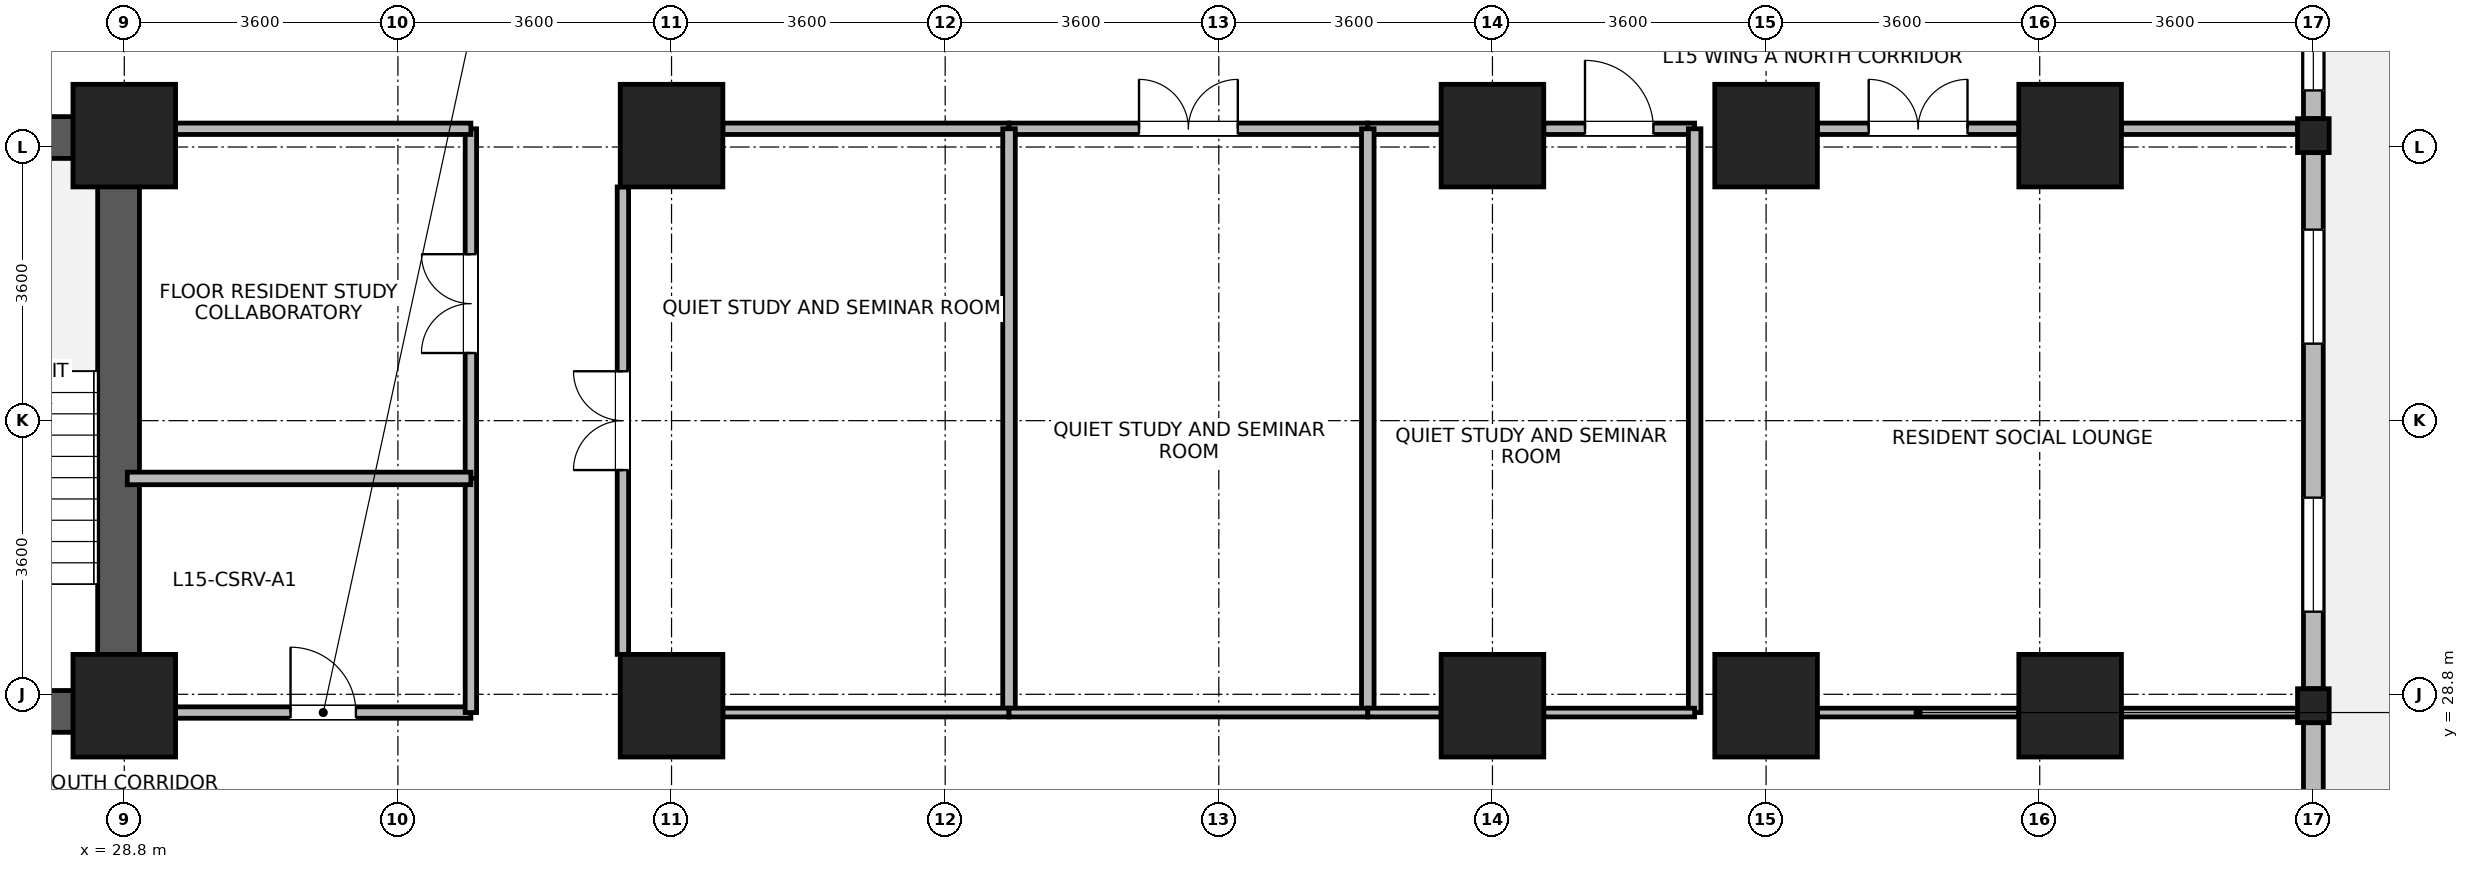
"""IFC4 building model, lengths in metres.
Left out: names, types, materials, properties, quantities, classifications, styles, units other than length and angle.
Written with IfcOpenShell. Run it as: python <this file> out.ifc"""

import sys

from ifc_helpers import new_model, si_unit, direction, frame, frame_2d, origin, origin_2d, place, context, subcontext, project, spatial, rectangle, i_section, extrude, source, transform, mapped, element, fill, save


model = new_model("IFC4")
c1 = context("Model", 3, precision=1e-05, world=origin(), true_north=direction((0.0, 1.0)))
c2 = subcontext(c1, "Body", "Model", "MODEL_VIEW")
j1 = project(units=[si_unit("LENGTHUNIT", "METRE"), si_unit("PLANEANGLEUNIT", "RADIAN")], contexts=[c1])
p1 = place(None, origin())
s1 = spatial("IfcSite", under=j1, at=p1, CompositionType="ELEMENT")
p2 = place(p1, origin())
s2 = spatial("IfcBuilding", under=s1, at=p2, CompositionType="ELEMENT")
p3 = place(p2, frame((0.0, 0.0, 62.3)))
s3 = spatial("IfcBuildingStorey", under=s2, at=p3, CompositionType="ELEMENT", Elevation=62.3)
p4 = place(p3, frame((28.725, 28.3, 0.0), z_axis=(0.0, 0.0, 1.0), x_axis=(0.0, 1.0, 0.0)))
e1 = element("IfcWall", 1, at=p4, inside=s3, PredefinedType="SHEAR", context=c2, shape_type="SweptSolid", body=[
    extrude(rectangle(XDim=8.1, YDim=0.55, at=frame_2d((4.05, 0.0))), origin(), (0.0, 0.0, 1.0), 3.45),
])
for number, where, z_axis, x_axis in (
    (2, (25.25, 28.575, 0.0), (0.0, 0.0, 1.0), (1.0, 0.0, 0.0)),
    (3, (25.25, 36.125, 0.0), (0.0, 0.0, 1.0), (1.0, 0.0, 0.0)),
):
    element("IfcWall", number, at=place(p3, frame(where, z_axis=z_axis, x_axis=x_axis)), inside=s3, PredefinedType="SHEAR", context=c2, shape_type="SweptSolid", body=[
        extrude(rectangle(XDim=3.2, YDim=0.55, at=frame_2d((1.6, 0.0))), origin(), (0.0, 0.0, 1.0), 3.45),
    ])
m1 = source(origin(), c2, "Body", "SweptSolid", [
    extrude(rectangle(XDim=1.35, YDim=1.35, at=origin_2d()), origin(), (0.0, 0.0, 1.0), 3.7),
])
for number, where, z_axis, x_axis in (
    (4, (28.8, 28.65, 0.0), (0.0, 0.0, 1.0), (1.0, 0.0, 0.0)),
    (5, (28.8, 36.15, 0.0), (0.0, 0.0, 1.0), (1.0, 0.0, 0.0)),
    (6, (36.0, 28.65, 0.0), (0.0, 0.0, 1.0), (1.0, 0.0, 0.0)),
    (7, (36.0, 36.15, 0.0), (0.0, 0.0, 1.0), (1.0, 0.0, 0.0)),
    (8, (46.8, 28.65, 0.0), (0.0, 0.0, 1.0), (1.0, 0.0, 0.0)),
    (9, (46.8, 36.15, 0.0), (0.0, 0.0, 1.0), (1.0, 0.0, 0.0)),
    (10, (50.4, 28.65, 0.0), (0.0, 0.0, 1.0), (1.0, 0.0, 0.0)),
    (11, (50.4, 36.15, 0.0), (0.0, 0.0, 1.0), (1.0, 0.0, 0.0)),
    (12, (54.4, 28.65, 0.0), (0.0, 0.0, 1.0), (1.0, 0.0, 0.0)),
    (13, (54.4, 36.15, 0.0), (0.0, 0.0, 1.0), (1.0, 0.0, 0.0)),
):
    element("IfcColumn", number, at=place(p3, frame(where, z_axis=z_axis, x_axis=x_axis)), inside=s3, PredefinedType="COLUMN", context=c2, shape_type="MappedRepresentation", body=[
        mapped(m1, transform((0.0, 0.0, 0.0), x_axis=(1.0, 0.0, 0.0), y_axis=(0.0, 1.0, 0.0), z_axis=(0.0, 0.0, 1.0), scale=1.0)),
    ])
m2 = source(origin(), c2, "Body", "SweptSolid", [
    extrude(i_section(OverallWidth=0.416, OverallDepth=0.446, WebThickness=0.029, FlangeThickness=0.04, FilletRadius=0.015, at=origin_2d()), origin(), (0.0, 0.0, 1.0), 3.7),
])
for number, where, z_axis, x_axis in (
    (14, (57.6, 28.65, 0.0), (0.0, 0.0, 1.0), (1.0, 0.0, 0.0)),
    (15, (57.6, 36.15, 0.0), (0.0, 0.0, 1.0), (1.0, 0.0, 0.0)),
):
    element("IfcColumn", number, at=place(p3, frame(where, z_axis=z_axis, x_axis=x_axis)), inside=s3, PredefinedType="COLUMN", context=c2, shape_type="MappedRepresentation", body=[
        mapped(m2, transform((0.0, 0.0, 0.0), x_axis=(1.0, 0.0, 0.0), y_axis=(0.0, 1.0, 0.0), z_axis=(0.0, 0.0, 1.0), scale=1.0)),
    ])
p5 = place(p3, frame((57.6, 28.426, 0.0), z_axis=(0.0, 0.0, 1.0), x_axis=(0.0, -1.0, 0.0)))
e16 = element("IfcWall", 16, at=p5, inside=s3, PredefinedType="STANDARD", context=c2, shape_type="SweptSolid", body=[
    extrude(rectangle(XDim=6.602, YDim=0.26, at=frame_2d((3.301, 0.0))), origin(), (0.0, 0.0, 1.0), 2.93),
])
p6 = place(p5, frame((4.201, 0.0, 0.85)))
e17 = element("IfcOpeningElement", 17, at=p6, cuts=e16, PredefinedType="OPENING", context=c2, shape_type="SweptSolid", body=[
    extrude(rectangle(XDim=1.5, YDim=1.85, at=frame_2d((0.75, 0.925))), frame((0.0, 0.14, 0.0), z_axis=(0.0, -1.0, 0.0), x_axis=(1.0, 0.0, 0.0)), (0.0, 0.0, 1.0), 0.28),
])
p7 = place(p5, frame((2.826, 0.0, 0.85)))
e18 = element("IfcOpeningElement", 18, at=p7, cuts=e16, PredefinedType="OPENING", context=c2, shape_type="SweptSolid", body=[
    extrude(rectangle(XDim=0.95, YDim=1.75, at=frame_2d((0.475, 0.875))), frame((0.0, 0.14, 0.0), z_axis=(0.0, -1.0, 0.0), x_axis=(1.0, 0.0, 0.0)), (0.0, 0.0, 1.0), 0.28),
])
p8 = place(p3, frame((57.6, 35.926, 0.0), z_axis=(0.0, 0.0, 1.0), x_axis=(0.0, -1.0, 0.0)))
e19 = element("IfcWall", 19, at=p8, inside=s3, PredefinedType="STANDARD", context=c2, shape_type="SweptSolid", body=[
    extrude(rectangle(XDim=7.052, YDim=0.26, at=frame_2d((3.526, 0.0))), origin(), (0.0, 0.0, 1.0), 2.93),
])
p9 = place(p8, frame((1.013, 0.0, 0.85)))
e20 = element("IfcOpeningElement", 20, at=p9, cuts=e19, PredefinedType="OPENING", context=c2, shape_type="SweptSolid", body=[
    extrude(rectangle(XDim=1.5, YDim=1.85, at=frame_2d((0.75, 0.925))), frame((0.0, 0.14, 0.0), z_axis=(0.0, -1.0, 0.0), x_axis=(1.0, 0.0, 0.0)), (0.0, 0.0, 1.0), 0.28),
])
p10 = place(p8, frame((4.539, 0.0, 0.85)))
e21 = element("IfcOpeningElement", 21, at=p10, cuts=e19, PredefinedType="OPENING", context=c2, shape_type="SweptSolid", body=[
    extrude(rectangle(XDim=1.5, YDim=1.85, at=frame_2d((0.75, 0.925))), frame((0.0, 0.14, 0.0), z_axis=(0.0, -1.0, 0.0), x_axis=(1.0, 0.0, 0.0)), (0.0, 0.0, 1.0), 0.28),
])
p11 = place(p3, frame((57.6, 39.73, 0.0), z_axis=(0.0, 0.0, 1.0), x_axis=(0.0, -1.0, 0.0)))
e22 = element("IfcWall", 22, at=p11, inside=s3, PredefinedType="STANDARD", context=c2, shape_type="SweptSolid", body=[
    extrude(rectangle(XDim=3.356, YDim=0.26, at=frame_2d((1.678, 0.0))), origin(), (0.0, 0.0, 1.0), 3.43),
])
p12 = place(p11, frame((2.035, 0.0, 0.85)))
e23 = element("IfcOpeningElement", 23, at=p12, cuts=e22, PredefinedType="OPENING", context=c2, shape_type="SweptSolid", body=[
    extrude(rectangle(XDim=0.95, YDim=1.75, at=frame_2d((0.475, 0.875))), frame((0.0, 0.14, 0.0), z_axis=(0.0, -1.0, 0.0), x_axis=(1.0, 0.0, 0.0)), (0.0, 0.0, 1.0), 0.28),
])
p13 = place(p11, frame((0.263, 0.0, 0.85)))
e24 = element("IfcOpeningElement", 24, at=p13, cuts=e22, PredefinedType="OPENING", context=c2, shape_type="SweptSolid", body=[
    extrude(rectangle(XDim=0.95, YDim=1.75, at=frame_2d((0.475, 0.875))), frame((0.0, 0.14, 0.0), z_axis=(0.0, -1.0, 0.0), x_axis=(1.0, 0.0, 0.0)), (0.0, 0.0, 1.0), 0.28),
])
p14 = place(p3, frame((51.075, 36.24, 0.0), z_axis=(0.0, 0.0, 1.0), x_axis=(1.0, 0.0, 0.0)))
e25 = element("IfcWall", 25, at=p14, inside=s3, PredefinedType="PARTITIONING", context=c2, shape_type="SweptSolid", body=[
    extrude(rectangle(XDim=2.65, YDim=0.15, at=frame_2d((1.325, 0.0))), origin(), (0.0, 0.0, 1.0), 2.78),
])
p15 = place(p14, frame((0.675, 0.0, 0.0)))
e26 = element("IfcOpeningElement", 26, at=p15, cuts=e25, PredefinedType="OPENING", context=c2, shape_type="SweptSolid", body=[
    extrude(rectangle(XDim=1.3, YDim=2.12, at=frame_2d((0.65, 1.06))), frame((0.0, 0.085, 0.0), z_axis=(0.0, -1.0, 0.0), x_axis=(1.0, 0.0, 0.0)), (0.0, 0.0, 1.0), 0.17),
])
p16 = place(p3, frame((55.075, 36.24, 0.0), z_axis=(0.0, 0.0, 1.0), x_axis=(1.0, 0.0, 0.0)))
e27 = element("IfcWall", 27, at=p16, inside=s3, PredefinedType="PARTITIONING", context=c2, shape_type="SweptSolid", body=[
    extrude(rectangle(XDim=2.317, YDim=0.15, at=frame_2d((1.159, 0.0))), origin(), (0.0, 0.0, 1.0), 2.78),
])
p17 = place(p3, frame((35.36, 29.325, 0.0), z_axis=(0.0, 0.0, 1.0), x_axis=(0.0, 1.0, 0.0)))
e28 = element("IfcWall", 28, at=p17, inside=s3, PredefinedType="PARTITIONING", context=c2, shape_type="SweptSolid", body=[
    extrude(rectangle(XDim=6.15, YDim=0.15, at=frame_2d((3.075, 0.0))), origin(), (0.0, 0.0, 1.0), 3.43),
])
p18 = place(p17, frame((2.425, 0.0, 0.0)))
e29 = element("IfcOpeningElement", 29, at=p18, cuts=e28, PredefinedType="OPENING", context=c2, shape_type="SweptSolid", body=[
    extrude(rectangle(XDim=1.3, YDim=2.12, at=frame_2d((0.65, 1.06))), frame((0.0, 0.085, 0.0), z_axis=(0.0, -1.0, 0.0), x_axis=(1.0, 0.0, 0.0)), (0.0, 0.0, 1.0), 0.17),
])
p19 = place(p3, frame((36.675, 36.24, 0.0), z_axis=(0.0, 0.0, 1.0), x_axis=(1.0, 0.0, 0.0)))
e30 = element("IfcWall", 30, at=p19, inside=s3, PredefinedType="PARTITIONING", context=c2, shape_type="SweptSolid", body=[
    extrude(rectangle(XDim=3.765, YDim=0.15, at=frame_2d((1.882, 0.0))), origin(), (0.0, 0.0, 1.0), 2.78),
])
p20 = place(p3, frame((40.44, 36.24, 0.0), z_axis=(0.0, 0.0, 1.0), x_axis=(1.0, 0.0, 0.0)))
e31 = element("IfcWall", 31, at=p20, inside=s3, PredefinedType="PARTITIONING", context=c2, shape_type="SweptSolid", body=[
    extrude(rectangle(XDim=4.72, YDim=0.15, at=frame_2d((2.36, 0.0))), origin(), (0.0, 0.0, 1.0), 2.78),
])
p21 = place(p20, frame((1.71, 0.0, 0.0)))
e32 = element("IfcOpeningElement", 32, at=p21, cuts=e31, PredefinedType="OPENING", context=c2, shape_type="SweptSolid", body=[
    extrude(rectangle(XDim=1.3, YDim=2.12, at=frame_2d((0.65, 1.06))), frame((0.0, 0.085, 0.0), z_axis=(0.0, -1.0, 0.0), x_axis=(1.0, 0.0, 0.0)), (0.0, 0.0, 1.0), 0.17),
])
p22 = place(p3, frame((33.36, 31.64, 0.0), z_axis=(0.0, 0.0, 1.0), x_axis=(0.0, 1.0, 0.0)))
e33 = element("IfcWall", 33, at=p22, inside=s3, PredefinedType="PARTITIONING", context=c2, shape_type="SweptSolid", body=[
    extrude(rectangle(XDim=4.6, YDim=0.15, at=frame_2d((2.3, 0.0))), origin(), (0.0, 0.0, 1.0), 3.43),
])
p23 = place(p22, frame((1.65, 0.0, 0.0)))
e34 = element("IfcOpeningElement", 34, at=p23, cuts=e33, PredefinedType="OPENING", context=c2, shape_type="SweptSolid", body=[
    extrude(rectangle(XDim=1.3, YDim=2.12, at=frame_2d((0.65, 1.06))), frame((0.0, 0.085, 0.0), z_axis=(0.0, -1.0, 0.0), x_axis=(1.0, 0.0, 0.0)), (0.0, 0.0, 1.0), 0.17),
])
p24 = place(p3, frame((29.475, 28.56, 0.0), z_axis=(0.0, 0.0, 1.0), x_axis=(1.0, 0.0, 0.0)))
e35 = element("IfcWall", 35, at=p24, inside=s3, PredefinedType="PARTITIONING", context=c2, shape_type="SweptSolid", body=[
    extrude(rectangle(XDim=3.885, YDim=0.15, at=frame_2d((1.942, 0.0))), origin(), (0.0, 0.0, 1.0), 2.78),
])
p25 = place(p24, frame((1.512, 0.0, 0.0)))
e36 = element("IfcOpeningElement", 36, at=p25, cuts=e35, PredefinedType="OPENING", context=c2, shape_type="SweptSolid", body=[
    extrude(rectangle(XDim=0.86, YDim=2.02, at=frame_2d((0.43, 1.01))), frame((0.0, 0.085, 0.0), z_axis=(0.0, -1.0, 0.0), x_axis=(1.0, 0.0, 0.0)), (0.0, 0.0, 1.0), 0.17),
])
p26 = place(p3, frame((29.475, 36.24, 0.0), z_axis=(0.0, 0.0, 1.0), x_axis=(1.0, 0.0, 0.0)))
e37 = element("IfcWall", 37, at=p26, inside=s3, PredefinedType="PARTITIONING", context=c2, shape_type="SweptSolid", body=[
    extrude(rectangle(XDim=3.885, YDim=0.15, at=frame_2d((1.942, 0.0))), origin(), (0.0, 0.0, 1.0), 2.78),
])
p27 = place(p3, frame((45.16, 36.24, 0.0), z_axis=(0.0, 0.0, 1.0), x_axis=(1.0, 0.0, 0.0)))
e38 = element("IfcWall", 38, at=p27, inside=s3, PredefinedType="PARTITIONING", context=c2, shape_type="SweptSolid", body=[
    extrude(rectangle(XDim=0.965, YDim=0.15, at=frame_2d((0.482, 0.0))), origin(), (0.0, 0.0, 1.0), 2.78),
])
p28 = place(p3, frame((47.475, 36.24, 0.0), z_axis=(0.0, 0.0, 1.0), x_axis=(1.0, 0.0, 0.0)))
e39 = element("IfcWall", 39, at=p28, inside=s3, PredefinedType="PARTITIONING", context=c2, shape_type="SweptSolid", body=[
    extrude(rectangle(XDim=1.985, YDim=0.15, at=frame_2d((0.992, 0.0))), origin(), (0.0, 0.0, 1.0), 2.78),
])
p29 = place(p28, frame((0.542, 0.0, 0.0)))
e40 = element("IfcOpeningElement", 40, at=p29, cuts=e39, PredefinedType="OPENING", context=c2, shape_type="SweptSolid", body=[
    extrude(rectangle(XDim=0.9, YDim=2.08, at=frame_2d((0.45, 1.04))), frame((0.0, 0.085, 0.0), z_axis=(0.0, -1.0, 0.0), x_axis=(1.0, 0.0, 0.0)), (0.0, 0.0, 1.0), 0.17),
])
p30 = place(p3, frame((33.36, 28.56, 0.0), z_axis=(0.0, 0.0, 1.0), x_axis=(0.0, 1.0, 0.0)))
e41 = element("IfcWall", 41, at=p30, inside=s3, PredefinedType="PARTITIONING", context=c2, shape_type="SweptSolid", body=[
    extrude(rectangle(XDim=3.08, YDim=0.15, at=frame_2d((1.54, 0.0))), origin(), (0.0, 0.0, 1.0), 3.43),
])
p31 = place(p3, frame((51.075, 28.56, 0.0), z_axis=(0.0, 0.0, 1.0), x_axis=(1.0, 0.0, 0.0)))
e42 = element("IfcWall", 42, at=p31, inside=s3, PredefinedType="PARTITIONING", context=c2, shape_type="SweptSolid", body=[
    extrude(rectangle(XDim=2.65, YDim=0.115, at=frame_2d((1.325, 0.0))), origin(), (0.0, 0.0, 1.0), 2.78),
])
p32 = place(p3, frame((55.075, 28.56, 0.0), z_axis=(0.0, 0.0, 1.0), x_axis=(1.0, 0.0, 0.0)))
e43 = element("IfcWall", 43, at=p32, inside=s3, PredefinedType="PARTITIONING", context=c2, shape_type="SweptSolid", body=[
    extrude(rectangle(XDim=2.317, YDim=0.115, at=frame_2d((1.159, 0.0))), origin(), (0.0, 0.0, 1.0), 2.78),
])
for number, where, z_axis, x_axis in (
    (44, (40.44, 28.56, 0.0), (0.0, 0.0, 1.0), (0.0, 1.0, 0.0)),
    (45, (45.16, 28.56, 0.0), (0.0, 0.0, 1.0), (0.0, 1.0, 0.0)),
    (46, (49.46, 28.56, 0.0), (0.0, 0.0, 1.0), (0.0, 1.0, 0.0)),
):
    element("IfcWall", number, at=place(p3, frame(where, z_axis=z_axis, x_axis=x_axis)), inside=s3, PredefinedType="PARTITIONING", context=c2, shape_type="SweptSolid", body=[
        extrude(rectangle(XDim=7.68, YDim=0.165, at=frame_2d((3.84, 0.0))), origin(), (0.0, 0.0, 1.0), 3.43),
    ])
p33 = place(p3, frame((36.675, 28.56, 0.0), z_axis=(0.0, 0.0, 1.0), x_axis=(1.0, 0.0, 0.0)))
e47 = element("IfcWall", 47, at=p33, inside=s3, PredefinedType="PARTITIONING", context=c2, shape_type="SweptSolid", body=[
    extrude(rectangle(XDim=3.765, YDim=0.115, at=frame_2d((1.882, 0.0))), origin(), (0.0, 0.0, 1.0), 2.78),
])
p34 = place(p3, frame((40.44, 28.56, 0.0), z_axis=(0.0, 0.0, 1.0), x_axis=(1.0, 0.0, 0.0)))
e48 = element("IfcWall", 48, at=p34, inside=s3, PredefinedType="PARTITIONING", context=c2, shape_type="SweptSolid", body=[
    extrude(rectangle(XDim=4.72, YDim=0.115, at=frame_2d((2.36, 0.0))), origin(), (0.0, 0.0, 1.0), 2.78),
])
p35 = place(p3, frame((28.84, 31.64, 0.0), z_axis=(0.0, 0.0, 1.0), x_axis=(1.0, 0.0, 0.0)))
e49 = element("IfcWall", 49, at=p35, inside=s3, PredefinedType="PARTITIONING", context=c2, shape_type="SweptSolid", body=[
    extrude(rectangle(XDim=4.52, YDim=0.165, at=frame_2d((2.26, 0.0))), origin(), (0.0, 0.0, 1.0), 3.43),
])
p36 = place(p3, frame((45.16, 28.56, 0.0), z_axis=(0.0, 0.0, 1.0), x_axis=(1.0, 0.0, 0.0)))
e50 = element("IfcWall", 50, at=p36, inside=s3, PredefinedType="PARTITIONING", context=c2, shape_type="SweptSolid", body=[
    extrude(rectangle(XDim=0.965, YDim=0.115, at=frame_2d((0.482, 0.0))), origin(), (0.0, 0.0, 1.0), 2.78),
])
p37 = place(p3, frame((47.475, 28.56, 0.0), z_axis=(0.0, 0.0, 1.0), x_axis=(1.0, 0.0, 0.0)))
e51 = element("IfcWall", 51, at=p37, inside=s3, PredefinedType="PARTITIONING", context=c2, shape_type="SweptSolid", body=[
    extrude(rectangle(XDim=1.985, YDim=0.115, at=frame_2d((0.992, 0.0))), origin(), (0.0, 0.0, 1.0), 2.78),
])
p38 = place(p9, origin())
e52 = element("IfcWindow", 52, at=p38, inside=s3, PartitioningType="SINGLE_PANEL", PredefinedType="WINDOW", context=c2, shape_type="SweptSolid", body=[
    extrude(rectangle(XDim=1.5, YDim=1.85, at=frame_2d((0.75, 0.925))), frame((0.0, 0.03, 0.0), z_axis=(0.0, -1.0, 0.0), x_axis=(1.0, 0.0, 0.0)), (0.0, 0.0, 1.0), 0.06),
])
fill(e20, e52)
p39 = place(p10, origin())
e53 = element("IfcWindow", 53, at=p39, inside=s3, PartitioningType="SINGLE_PANEL", PredefinedType="WINDOW", context=c2, shape_type="SweptSolid", body=[
    extrude(rectangle(XDim=1.5, YDim=1.85, at=frame_2d((0.75, 0.925))), frame((0.0, 0.03, 0.0), z_axis=(0.0, -1.0, 0.0), x_axis=(1.0, 0.0, 0.0)), (0.0, 0.0, 1.0), 0.06),
])
fill(e21, e53)
p40 = place(p12, origin())
e54 = element("IfcWindow", 54, at=p40, inside=s3, PartitioningType="SINGLE_PANEL", PredefinedType="WINDOW", context=c2, shape_type="SweptSolid", body=[
    extrude(rectangle(XDim=0.95, YDim=1.75, at=frame_2d((0.475, 0.875))), frame((0.0, 0.03, 0.0), z_axis=(0.0, -1.0, 0.0), x_axis=(1.0, 0.0, 0.0)), (0.0, 0.0, 1.0), 0.06),
])
fill(e23, e54)
p41 = place(p15, origin())
e55 = element("IfcDoor", 55, at=p41, inside=s3, OperationType="DOUBLE_DOOR_SINGLE_SWING", PredefinedType="DOOR", context=c2, shape_type="SweptSolid", body=[
    extrude(rectangle(XDim=1.3, YDim=2.12, at=frame_2d((0.65, 1.06))), frame((0.0, 0.025, 0.0), z_axis=(0.0, -1.0, 0.0), x_axis=(1.0, 0.0, 0.0)), (0.0, 0.0, 1.0), 0.05),
])
fill(e26, e55)
p42 = place(p18, origin())
e56 = element("IfcDoor", 56, at=p42, inside=s3, OperationType="DOUBLE_DOOR_SINGLE_SWING", PredefinedType="DOOR", context=c2, shape_type="SweptSolid", body=[
    extrude(rectangle(XDim=1.3, YDim=2.12, at=frame_2d((0.65, 1.06))), frame((0.0, 0.025, 0.0), z_axis=(0.0, -1.0, 0.0), x_axis=(1.0, 0.0, 0.0)), (0.0, 0.0, 1.0), 0.05),
])
fill(e29, e56)
p43 = place(p21, origin())
e57 = element("IfcDoor", 57, at=p43, inside=s3, OperationType="DOUBLE_DOOR_SINGLE_SWING", PredefinedType="DOOR", context=c2, shape_type="SweptSolid", body=[
    extrude(rectangle(XDim=1.3, YDim=2.12, at=frame_2d((0.65, 1.06))), frame((0.0, 0.025, 0.0), z_axis=(0.0, -1.0, 0.0), x_axis=(1.0, 0.0, 0.0)), (0.0, 0.0, 1.0), 0.05),
])
fill(e32, e57)
p44 = place(p23, origin())
e58 = element("IfcDoor", 58, at=p44, inside=s3, OperationType="DOUBLE_DOOR_SINGLE_SWING", PredefinedType="DOOR", context=c2, shape_type="SweptSolid", body=[
    extrude(rectangle(XDim=1.3, YDim=2.12, at=frame_2d((0.65, 1.06))), frame((0.0, 0.025, 0.0), z_axis=(0.0, -1.0, 0.0), x_axis=(1.0, 0.0, 0.0)), (0.0, 0.0, 1.0), 0.05),
])
fill(e34, e58)
p45 = place(p25, origin())
e59 = element("IfcDoor", 59, at=p45, inside=s3, OperationType="SINGLE_SWING_LEFT", PredefinedType="DOOR", context=c2, shape_type="SweptSolid", body=[
    extrude(rectangle(XDim=0.86, YDim=2.02, at=frame_2d((0.43, 1.01))), frame((0.0, 0.025, 0.0), z_axis=(0.0, -1.0, 0.0), x_axis=(1.0, 0.0, 0.0)), (0.0, 0.0, 1.0), 0.05),
])
fill(e36, e59)
p46 = place(p29, origin())
e60 = element("IfcDoor", 60, at=p46, inside=s3, OperationType="SINGLE_SWING_LEFT", PredefinedType="DOOR", context=c2, shape_type="SweptSolid", body=[
    extrude(rectangle(XDim=0.9, YDim=2.08, at=frame_2d((0.45, 1.04))), frame((0.0, 0.025, 0.0), z_axis=(0.0, -1.0, 0.0), x_axis=(1.0, 0.0, 0.0)), (0.0, 0.0, 1.0), 0.05),
])
fill(e40, e60)
save(model, sys.argv[1])
